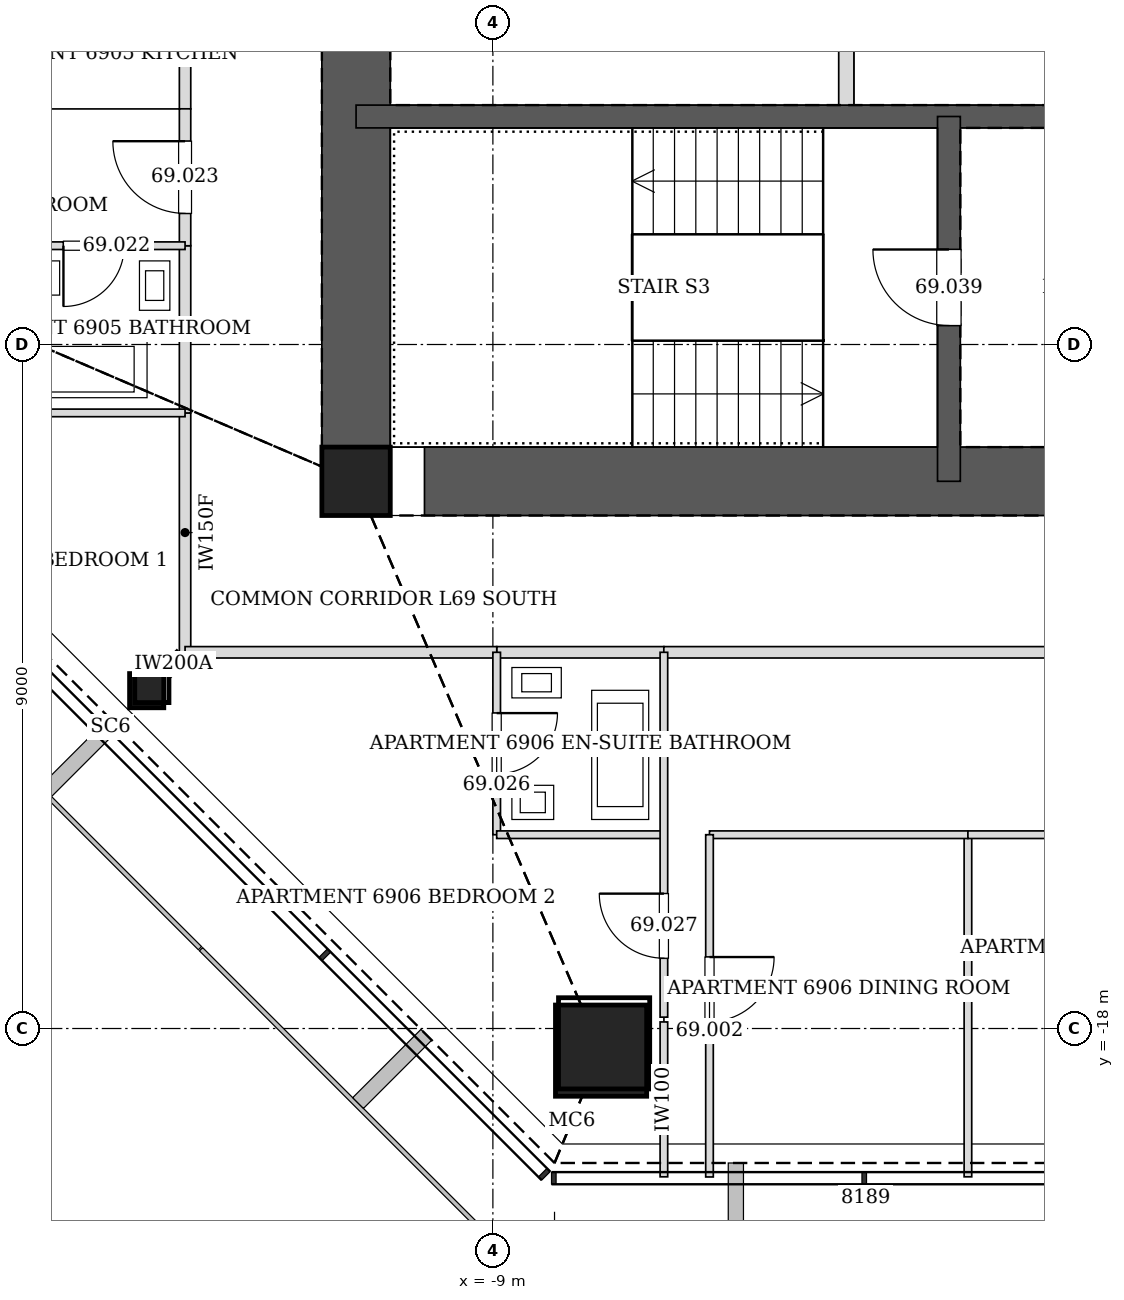
"""IFC4 building model, lengths in metres.
Left out: names, types, materials, properties, quantities, classifications, styles, units other than length and angle.
Written with IfcOpenShell. Run it as: python <this file> out.ifc"""

import sys

from ifc_helpers import new_model, si_unit, direction, frame, frame_2d, origin, origin_2d, place, context, subcontext, project, spatial, rectangle, hollow_rectangle, extrude, element, fill, save


model = new_model("IFC4")
c1 = context("Model", 3, precision=1e-05, world=origin(), true_north=direction((0.0, 1.0)))
c2 = subcontext(c1, "Body", "Model", "MODEL_VIEW")
j1 = project(units=[si_unit("LENGTHUNIT", "METRE"), si_unit("PLANEANGLEUNIT", "RADIAN")], contexts=[c1])
p1 = place(None, origin())
s1 = spatial("IfcSite", under=j1, at=p1, CompositionType="ELEMENT")
p2 = place(p1, origin())
s2 = spatial("IfcBuilding", under=s1, at=p2, CompositionType="ELEMENT")
p3 = place(p2, frame((0.0, 0.0, 284.4)))
s3 = spatial("IfcBuildingStorey", under=s2, at=p3, CompositionType="ELEMENT", Elevation=284.4)
p4 = place(p3, frame((-7.576, -18.291, 0.0), z_axis=(0.011698403216, 0.028277121884, 0.999531666202), x_axis=(-0.924045401938, 0.382282742426, 0.0)))
e1 = element("IfcColumn", 1, at=p4, inside=s3, PredefinedType="COLUMN", context=c2, shape_type="SweptSolid", body=[
    extrude(hollow_rectangle(XDim=1.2, YDim=1.2, WallThickness=0.055, at=origin_2d()), origin(), (0.0, 0.0, 1.0), 3.402),
])
p5 = place(p3, frame((-13.555, -13.555, 0.0), z_axis=(0.020024994503, 0.020024994503, 0.999598919162), x_axis=(-0.707106781187, 0.707106781187, 0.0)))
e2 = element("IfcColumn", 2, at=p5, inside=s3, PredefinedType="COLUMN", context=c2, shape_type="SweptSolid", body=[
    extrude(hollow_rectangle(XDim=0.45, YDim=0.45, WallThickness=0.02, at=origin_2d()), origin(), (0.0, 0.0, 1.0), 3.402),
])
p6 = place(p3, frame((-10.8, -10.8, 0.0), z_axis=(0.0, 0.0, 1.0), x_axis=(1.0, 0.0, 0.0)))
e3 = element("IfcColumn", 3, at=p6, inside=s3, PredefinedType="COLUMN", context=c2, shape_type="SweptSolid", body=[
    extrude(hollow_rectangle(XDim=0.9, YDim=0.9, WallThickness=0.04, at=origin_2d()), origin(), (0.0, 0.0, 1.0), 3.4),
])
p7 = place(p3, frame((-10.8, -10.8, 0.0), z_axis=(0.0, 0.0, 1.0), x_axis=(1.0, 0.0, 0.0)))
e4 = element("IfcWall", 4, at=p7, inside=s3, PredefinedType="SOLIDWALL", context=c2, shape_type="SweptSolid", body=[
    extrude(rectangle(XDim=21.6, YDim=0.9, at=frame_2d((10.8, 0.0))), origin(), (0.0, 0.0, 1.0), 3.4),
])
p8 = place(p7, frame((10.05, 0.0, 0.0)))
e5 = element("IfcOpeningElement", 5, at=p8, cuts=e4, PredefinedType="OPENING", context=c2, shape_type="SweptSolid", body=[
    extrude(rectangle(XDim=1.5, YDim=2.1, at=frame_2d((0.75, 1.05))), frame((0.0, 0.46, 0.0), z_axis=(0.0, -1.0, 0.0), x_axis=(1.0, 0.0, 0.0)), (0.0, 0.0, 1.0), 0.92),
])
p9 = place(p7, frame((17.1, 0.0, 0.0)))
e6 = element("IfcOpeningElement", 6, at=p9, cuts=e4, PredefinedType="OPENING", context=c2, shape_type="SweptSolid", body=[
    extrude(rectangle(XDim=0.9, YDim=2.1, at=frame_2d((0.45, 1.05))), frame((0.0, 0.46, 0.0), z_axis=(0.0, -1.0, 0.0), x_axis=(1.0, 0.0, 0.0)), (0.0, 0.0, 1.0), 0.92),
])
p10 = place(p3, frame((-10.8, 10.8, 0.0), z_axis=(0.0, 0.0, 1.0), x_axis=(0.0, -1.0, 0.0)))
e7 = element("IfcWall", 7, at=p10, inside=s3, PredefinedType="SOLIDWALL", context=c2, shape_type="SweptSolid", body=[
    extrude(rectangle(XDim=21.6, YDim=0.9, at=frame_2d((10.8, 0.0))), origin(), (0.0, 0.0, 1.0), 3.4),
])
p11 = place(p10, frame((8.7, 0.0, 0.0)))
e8 = element("IfcOpeningElement", 8, at=p11, cuts=e7, PredefinedType="OPENING", context=c2, shape_type="SweptSolid", body=[
    extrude(rectangle(XDim=1.2, YDim=2.1, at=frame_2d((0.6, 1.05))), frame((0.0, 0.46, 0.0), z_axis=(0.0, -1.0, 0.0), x_axis=(1.0, 0.0, 0.0)), (0.0, 0.0, 1.0), 0.92),
])
p12 = place(p10, frame((11.7, 0.0, 0.0)))
e9 = element("IfcOpeningElement", 9, at=p12, cuts=e7, PredefinedType="OPENING", context=c2, shape_type="SweptSolid", body=[
    extrude(rectangle(XDim=1.2, YDim=2.1, at=frame_2d((0.6, 1.05))), frame((0.0, 0.46, 0.0), z_axis=(0.0, -1.0, 0.0), x_axis=(1.0, 0.0, 0.0)), (0.0, 0.0, 1.0), 0.92),
])
p13 = place(p3, frame((-10.8, -6.0, 0.0), z_axis=(0.0, 0.0, 1.0), x_axis=(1.0, 0.0, 0.0)))
e10 = element("IfcWall", 10, at=p13, inside=s3, PredefinedType="SOLIDWALL", context=c2, shape_type="SweptSolid", body=[
    extrude(rectangle(XDim=21.6, YDim=0.3, at=frame_2d((10.8, 0.0))), origin(), (0.0, 0.0, 1.0), 3.4),
])
p14 = place(p13, frame((10.25, 0.0, 0.0)))
e11 = element("IfcOpeningElement", 11, at=p14, cuts=e10, PredefinedType="OPENING", context=c2, shape_type="SweptSolid", body=[
    extrude(rectangle(XDim=1.1, YDim=2.1, at=frame_2d((0.55, 1.05))), frame((0.0, 0.16, 0.0), z_axis=(0.0, -1.0, 0.0), x_axis=(1.0, 0.0, 0.0)), (0.0, 0.0, 1.0), 0.32),
])
p15 = place(p3, frame((-3.0, -6.0, 0.0), z_axis=(0.0, 0.0, 1.0), x_axis=(0.0, -1.0, 0.0)))
e12 = element("IfcWall", 12, at=p15, inside=s3, PredefinedType="SOLIDWALL", context=c2, shape_type="SweptSolid", body=[
    extrude(rectangle(XDim=4.8, YDim=0.3, at=frame_2d((2.4, 0.0))), origin(), (0.0, 0.0, 1.0), 3.4),
])
p16 = place(p15, frame((1.75, 0.0, 0.0)))
e13 = element("IfcOpeningElement", 13, at=p16, cuts=e12, PredefinedType="OPENING", context=c2, shape_type="SweptSolid", body=[
    extrude(rectangle(XDim=1.0, YDim=2.1, at=frame_2d((0.5, 1.05))), frame((0.0, 0.16, 0.0), z_axis=(0.0, -1.0, 0.0), x_axis=(1.0, 0.0, 0.0)), (0.0, 0.0, 1.0), 0.32),
])
p17 = place(p3, frame((-13.05, -9.899, 0.0), z_axis=(0.0, 0.0, 1.0), x_axis=(0.0, -1.0, 0.0)))
e14 = element("IfcWall", 14, at=p17, inside=s3, PredefinedType="PARTITIONING", context=c2, shape_type="SweptSolid", body=[
    extrude(rectangle(XDim=3.151, YDim=0.15, at=frame_2d((1.576, 0.0))), origin(), (0.0, 0.0, 1.0), 2.497),
])
p18 = place(p3, frame((-13.05, -7.699, 0.0), z_axis=(0.0, 0.0, 1.0), x_axis=(0.0, -1.0, 0.0)))
e15 = element("IfcWall", 15, at=p18, inside=s3, PredefinedType="PARTITIONING", context=c2, shape_type="SweptSolid", body=[
    extrude(rectangle(XDim=2.202, YDim=0.15, at=frame_2d((1.101, 0.0))), origin(), (0.0, 0.0, 1.0), 2.497),
])
p19 = place(p3, frame((-13.05, -4.449, 0.0), z_axis=(0.0, 0.0, 1.0), x_axis=(0.0, -1.0, 0.0)))
e16 = element("IfcWall", 16, at=p19, inside=s3, PredefinedType="PARTITIONING", context=c2, shape_type="SweptSolid", body=[
    extrude(rectangle(XDim=1.452, YDim=0.15, at=frame_2d((0.726, 0.0))), origin(), (0.0, 0.0, 1.0), 3.2),
])
p20 = place(p3, frame((-13.05, -5.899, 0.0), z_axis=(0.0, 0.0, 1.0), x_axis=(0.0, -1.0, 0.0)))
e17 = element("IfcWall", 17, at=p20, inside=s3, PredefinedType="PARTITIONING", context=c2, shape_type="SweptSolid", body=[
    extrude(rectangle(XDim=1.802, YDim=0.15, at=frame_2d((0.901, 0.0))), origin(), (0.0, 0.0, 1.0), 3.2),
])
p21 = place(p20, frame((0.426, 0.0, 0.0)))
e18 = element("IfcOpeningElement", 18, at=p21, cuts=e17, PredefinedType="OPENING", context=c2, shape_type="SweptSolid", body=[
    extrude(rectangle(XDim=0.95, YDim=2.1, at=frame_2d((0.475, 1.05))), frame((0.0, 0.085, 0.0), z_axis=(0.0, -1.0, 0.0), x_axis=(1.0, 0.0, 0.0)), (0.0, 0.0, 1.0), 0.17),
])
p22 = place(p3, frame((-8.951, -13.05, 0.0), z_axis=(0.0, 0.0, 1.0), x_axis=(1.0, 0.0, 0.0)))
e19 = element("IfcWall", 19, at=p22, inside=s3, PredefinedType="PARTITIONING", context=c2, shape_type="SweptSolid", body=[
    extrude(rectangle(XDim=2.202, YDim=0.15, at=frame_2d((1.101, 0.0))), origin(), (0.0, 0.0, 1.0), 3.2),
])
p23 = place(p3, frame((-13.05, -13.05, 0.0), z_axis=(0.0, 0.0, 1.0), x_axis=(1.0, 0.0, 0.0)))
e20 = element("IfcWall", 20, at=p23, inside=s3, PredefinedType="PARTITIONING", context=c2, shape_type="SweptSolid", body=[
    extrude(rectangle(XDim=4.101, YDim=0.15, at=frame_2d((2.051, 0.0))), origin(), (0.0, 0.0, 1.0), 2.497),
])
p24 = place(p3, frame((-6.751, -13.05, 0.0), z_axis=(0.0, 0.0, 1.0), x_axis=(1.0, 0.0, 0.0)))
e21 = element("IfcWall", 21, at=p24, inside=s3, PredefinedType="PARTITIONING", context=c2, shape_type="SweptSolid", body=[
    extrude(rectangle(XDim=9.802, YDim=0.15, at=frame_2d((4.901, 0.0))), origin(), (0.0, 0.0, 1.0), 2.349),
])
p25 = place(p3, frame((-2.75, -19.951, 0.0), z_axis=(0.0, 0.0, 1.0), x_axis=(0.0, 1.0, 0.0)))
e22 = element("IfcWall", 22, at=p25, inside=s3, PredefinedType="PARTITIONING", context=c2, shape_type="SweptSolid", body=[
    extrude(rectangle(XDim=4.501, YDim=0.1, at=frame_2d((2.251, 0.0))), origin(), (0.0, 0.0, 1.0), 2.591),
])
p26 = place(p3, frame((-2.75, -15.45, 0.0), z_axis=(0.0, 0.0, 1.0), x_axis=(-1.0, 0.0, 0.0)))
e23 = element("IfcWall", 23, at=p26, inside=s3, PredefinedType="PARTITIONING", context=c2, shape_type="SweptSolid", body=[
    extrude(rectangle(XDim=3.4, YDim=0.1, at=frame_2d((1.7, 0.0))), origin(), (0.0, 0.0, 1.0), 3.2),
])
p27 = place(p3, frame((-6.15, -15.45, 0.0), z_axis=(0.0, 0.0, 1.0), x_axis=(0.0, -1.0, 0.0)))
e24 = element("IfcWall", 24, at=p27, inside=s3, PredefinedType="PARTITIONING", context=c2, shape_type="SweptSolid", body=[
    extrude(rectangle(XDim=4.503, YDim=0.1, at=frame_2d((2.252, 0.0))), origin(), (0.0, 0.0, 1.0), 2.591),
])
p28 = place(p27, frame((1.61, 0.0, 0.0)))
e25 = element("IfcOpeningElement", 25, at=p28, cuts=e24, PredefinedType="OPENING", context=c2, shape_type="SweptSolid", body=[
    extrude(rectangle(XDim=0.85, YDim=2.1, at=frame_2d((0.425, 1.05))), frame((0.0, 0.06, 0.0), z_axis=(0.0, -1.0, 0.0), x_axis=(1.0, 0.0, 0.0)), (0.0, 0.0, 1.0), 0.12),
])
p29 = place(p3, frame((-13.05, -9.9, 0.0), z_axis=(0.0, 0.0, 1.0), x_axis=(-1.0, 0.0, 0.0)))
e26 = element("IfcWall", 26, at=p29, inside=s3, PredefinedType="PARTITIONING", context=c2, shape_type="SweptSolid", body=[
    extrude(rectangle(XDim=2.401, YDim=0.1, at=frame_2d((1.2, 0.0))), origin(), (0.0, 0.0, 1.0), 2.497),
])
p30 = place(p3, frame((-13.314, -13.314, 0.0), z_axis=(0.0, 0.0, 1.0), x_axis=(0.707106781187, 0.707106781187, 0.0)))
e27 = element("IfcWall", 27, at=p30, inside=s3, PredefinedType="PARTITIONING", context=c2, shape_type="SweptSolid", body=[
    extrude(rectangle(XDim=0.321, YDim=0.2, at=frame_2d((0.16, 0.0))), origin(), (0.0, 0.0, 1.0), 2.591),
])
p31 = place(p3, frame((-13.05, -7.7, 0.0), z_axis=(0.0, 0.0, 1.0), x_axis=(-1.0, 0.0, 0.0)))
e28 = element("IfcWall", 28, at=p31, inside=s3, PredefinedType="PARTITIONING", context=c2, shape_type="SweptSolid", body=[
    extrude(rectangle(XDim=2.4, YDim=0.1, at=frame_2d((1.2, 0.0))), origin(), (0.0, 0.0, 1.0), 2.591),
])
p32 = place(p31, frame((0.8, 0.0, 0.0)))
e29 = element("IfcOpeningElement", 29, at=p32, cuts=e28, PredefinedType="OPENING", context=c2, shape_type="SweptSolid", body=[
    extrude(rectangle(XDim=0.8, YDim=2.1, at=frame_2d((0.4, 1.05))), frame((0.0, 0.06, 0.0), z_axis=(0.0, -1.0, 0.0), x_axis=(1.0, 0.0, 0.0)), (0.0, 0.0, 1.0), 0.12),
])
p33 = place(p3, frame((1.25, -15.45, 0.0), z_axis=(0.0, 0.0, 1.0), x_axis=(-1.0, 0.0, 0.0)))
e30 = element("IfcWall", 30, at=p33, inside=s3, PredefinedType="PARTITIONING", context=c2, shape_type="SweptSolid", body=[
    extrude(rectangle(XDim=4.0, YDim=0.1, at=frame_2d((2.0, 0.0))), origin(), (0.0, 0.0, 1.0), 2.349),
])
p34 = place(p3, frame((-8.95, -13.05, 0.0), z_axis=(0.0, 0.0, 1.0), x_axis=(0.0, -1.0, 0.0)))
e31 = element("IfcWall", 31, at=p34, inside=s3, PredefinedType="PARTITIONING", context=c2, shape_type="SweptSolid", body=[
    extrude(rectangle(XDim=2.4, YDim=0.1, at=frame_2d((1.2, 0.0))), origin(), (0.0, 0.0, 1.0), 2.497),
])
p35 = place(p34, frame((0.8, 0.0, 0.0)))
e32 = element("IfcOpeningElement", 32, at=p35, cuts=e31, PredefinedType="OPENING", context=c2, shape_type="SweptSolid", body=[
    extrude(rectangle(XDim=0.8, YDim=2.1, at=frame_2d((0.4, 1.05))), frame((0.0, 0.06, 0.0), z_axis=(0.0, -1.0, 0.0), x_axis=(1.0, 0.0, 0.0)), (0.0, 0.0, 1.0), 0.12),
])
p36 = place(p3, frame((-8.95, -15.45, 0.0), z_axis=(0.0, 0.0, 1.0), x_axis=(1.0, 0.0, 0.0)))
e33 = element("IfcWall", 33, at=p36, inside=s3, PredefinedType="PARTITIONING", context=c2, shape_type="SweptSolid", body=[
    extrude(rectangle(XDim=2.2, YDim=0.1, at=frame_2d((1.1, 0.0))), origin(), (0.0, 0.0, 1.0), 2.497),
])
p37 = place(p3, frame((-6.75, -13.05, 0.0), z_axis=(0.0, 0.0, 1.0), x_axis=(0.0, -1.0, 0.0)))
e34 = element("IfcWall", 34, at=p37, inside=s3, PredefinedType="PARTITIONING", context=c2, shape_type="SweptSolid", body=[
    extrude(rectangle(XDim=4.801, YDim=0.1, at=frame_2d((2.4, 0.0))), origin(), (0.0, 0.0, 1.0), 2.591),
])
p38 = place(p37, frame((3.175, 0.0, 0.0)))
e35 = element("IfcOpeningElement", 35, at=p38, cuts=e34, PredefinedType="OPENING", context=c2, shape_type="SweptSolid", body=[
    extrude(rectangle(XDim=0.85, YDim=2.1, at=frame_2d((0.425, 1.05))), frame((0.0, 0.06, 0.0), z_axis=(0.0, -1.0, 0.0), x_axis=(1.0, 0.0, 0.0)), (0.0, 0.0, 1.0), 0.12),
])
p39 = place(p3, frame((-6.75, -19.951, 0.0), z_axis=(0.0, 0.0, 1.0), x_axis=(0.0, 1.0, 0.0)))
e36 = element("IfcWall", 36, at=p39, inside=s3, PredefinedType="PARTITIONING", context=c2, shape_type="SweptSolid", body=[
    extrude(rectangle(XDim=2.038, YDim=0.1, at=frame_2d((1.019, 0.0))), origin(), (0.0, 0.0, 1.0), 2.74),
])
p40 = place(p3, frame((-4.35, -5.85, 0.0), z_axis=(0.0, 0.0, 1.0), x_axis=(0.0, 1.0, 0.0)))
e37 = element("IfcWall", 37, at=p40, inside=s3, PredefinedType="PARTITIONING", context=c2, shape_type="SweptSolid", body=[
    extrude(rectangle(XDim=2.7, YDim=0.2, at=frame_2d((1.35, 0.0))), origin(), (0.0, 0.0, 1.0), 3.2),
])
p41 = place(p28, origin())
e38 = element("IfcDoor", 38, at=p41, inside=s3, OperationType="SINGLE_SWING_LEFT", PredefinedType="DOOR", context=c2, shape_type="SweptSolid", body=[
    extrude(rectangle(XDim=0.85, YDim=2.1, at=frame_2d((0.425, 1.05))), frame((0.0, 0.025, 0.0), z_axis=(0.0, -1.0, 0.0), x_axis=(1.0, 0.0, 0.0)), (0.0, 0.0, 1.0), 0.05),
])
fill(e25, e38)
p42 = place(p32, origin())
e39 = element("IfcDoor", 39, at=p42, inside=s3, OperationType="SINGLE_SWING_RIGHT", PredefinedType="DOOR", context=c2, shape_type="SweptSolid", body=[
    extrude(rectangle(XDim=0.8, YDim=2.1, at=frame_2d((0.4, 1.05))), frame((0.0, 0.025, 0.0), z_axis=(0.0, -1.0, 0.0), x_axis=(1.0, 0.0, 0.0)), (0.0, 0.0, 1.0), 0.05),
])
fill(e29, e39)
p43 = place(p21, frame((0.95, 0.0, 0.0), z_axis=(0.0, 0.0, 1.0), x_axis=(-1.0, 0.0, 0.0)))
e40 = element("IfcDoor", 40, at=p43, inside=s3, OperationType="SINGLE_SWING_RIGHT", PredefinedType="DOOR", context=c2, shape_type="SweptSolid", body=[
    extrude(rectangle(XDim=0.95, YDim=2.1, at=frame_2d((0.475, 1.05))), frame((0.0, 0.025, 0.0), z_axis=(0.0, -1.0, 0.0), x_axis=(1.0, 0.0, 0.0)), (0.0, 0.0, 1.0), 0.05),
])
fill(e18, e40)
p44 = place(p35, origin())
e41 = element("IfcDoor", 41, at=p44, inside=s3, OperationType="SINGLE_SWING_LEFT", PredefinedType="DOOR", context=c2, shape_type="SweptSolid", body=[
    extrude(rectangle(XDim=0.8, YDim=2.1, at=frame_2d((0.4, 1.05))), frame((0.0, 0.025, 0.0), z_axis=(0.0, -1.0, 0.0), x_axis=(1.0, 0.0, 0.0)), (0.0, 0.0, 1.0), 0.05),
])
fill(e32, e41)
p45 = place(p38, frame((0.85, 0.0, 0.0), z_axis=(0.0, 0.0, 1.0), x_axis=(-1.0, 0.0, 0.0)))
e42 = element("IfcDoor", 42, at=p45, inside=s3, OperationType="SINGLE_SWING_RIGHT", PredefinedType="DOOR", context=c2, shape_type="SweptSolid", body=[
    extrude(rectangle(XDim=0.85, YDim=2.1, at=frame_2d((0.425, 1.05))), frame((0.0, 0.025, 0.0), z_axis=(0.0, -1.0, 0.0), x_axis=(1.0, 0.0, 0.0)), (0.0, 0.0, 1.0), 0.05),
])
fill(e35, e42)
p46 = place(p16, frame((1.0, 0.0, 0.0), z_axis=(0.0, 0.0, 1.0), x_axis=(-1.0, 0.0, 0.0)))
e43 = element("IfcDoor", 43, at=p46, inside=s3, OperationType="SINGLE_SWING_RIGHT", PredefinedType="DOOR", context=c2, shape_type="SweptSolid", body=[
    extrude(rectangle(XDim=1.0, YDim=2.1, at=frame_2d((0.5, 1.05))), frame((0.0, 0.025, 0.0), z_axis=(0.0, -1.0, 0.0), x_axis=(1.0, 0.0, 0.0)), (0.0, 0.0, 1.0), 0.05),
])
fill(e13, e43)
save(model, sys.argv[1])
